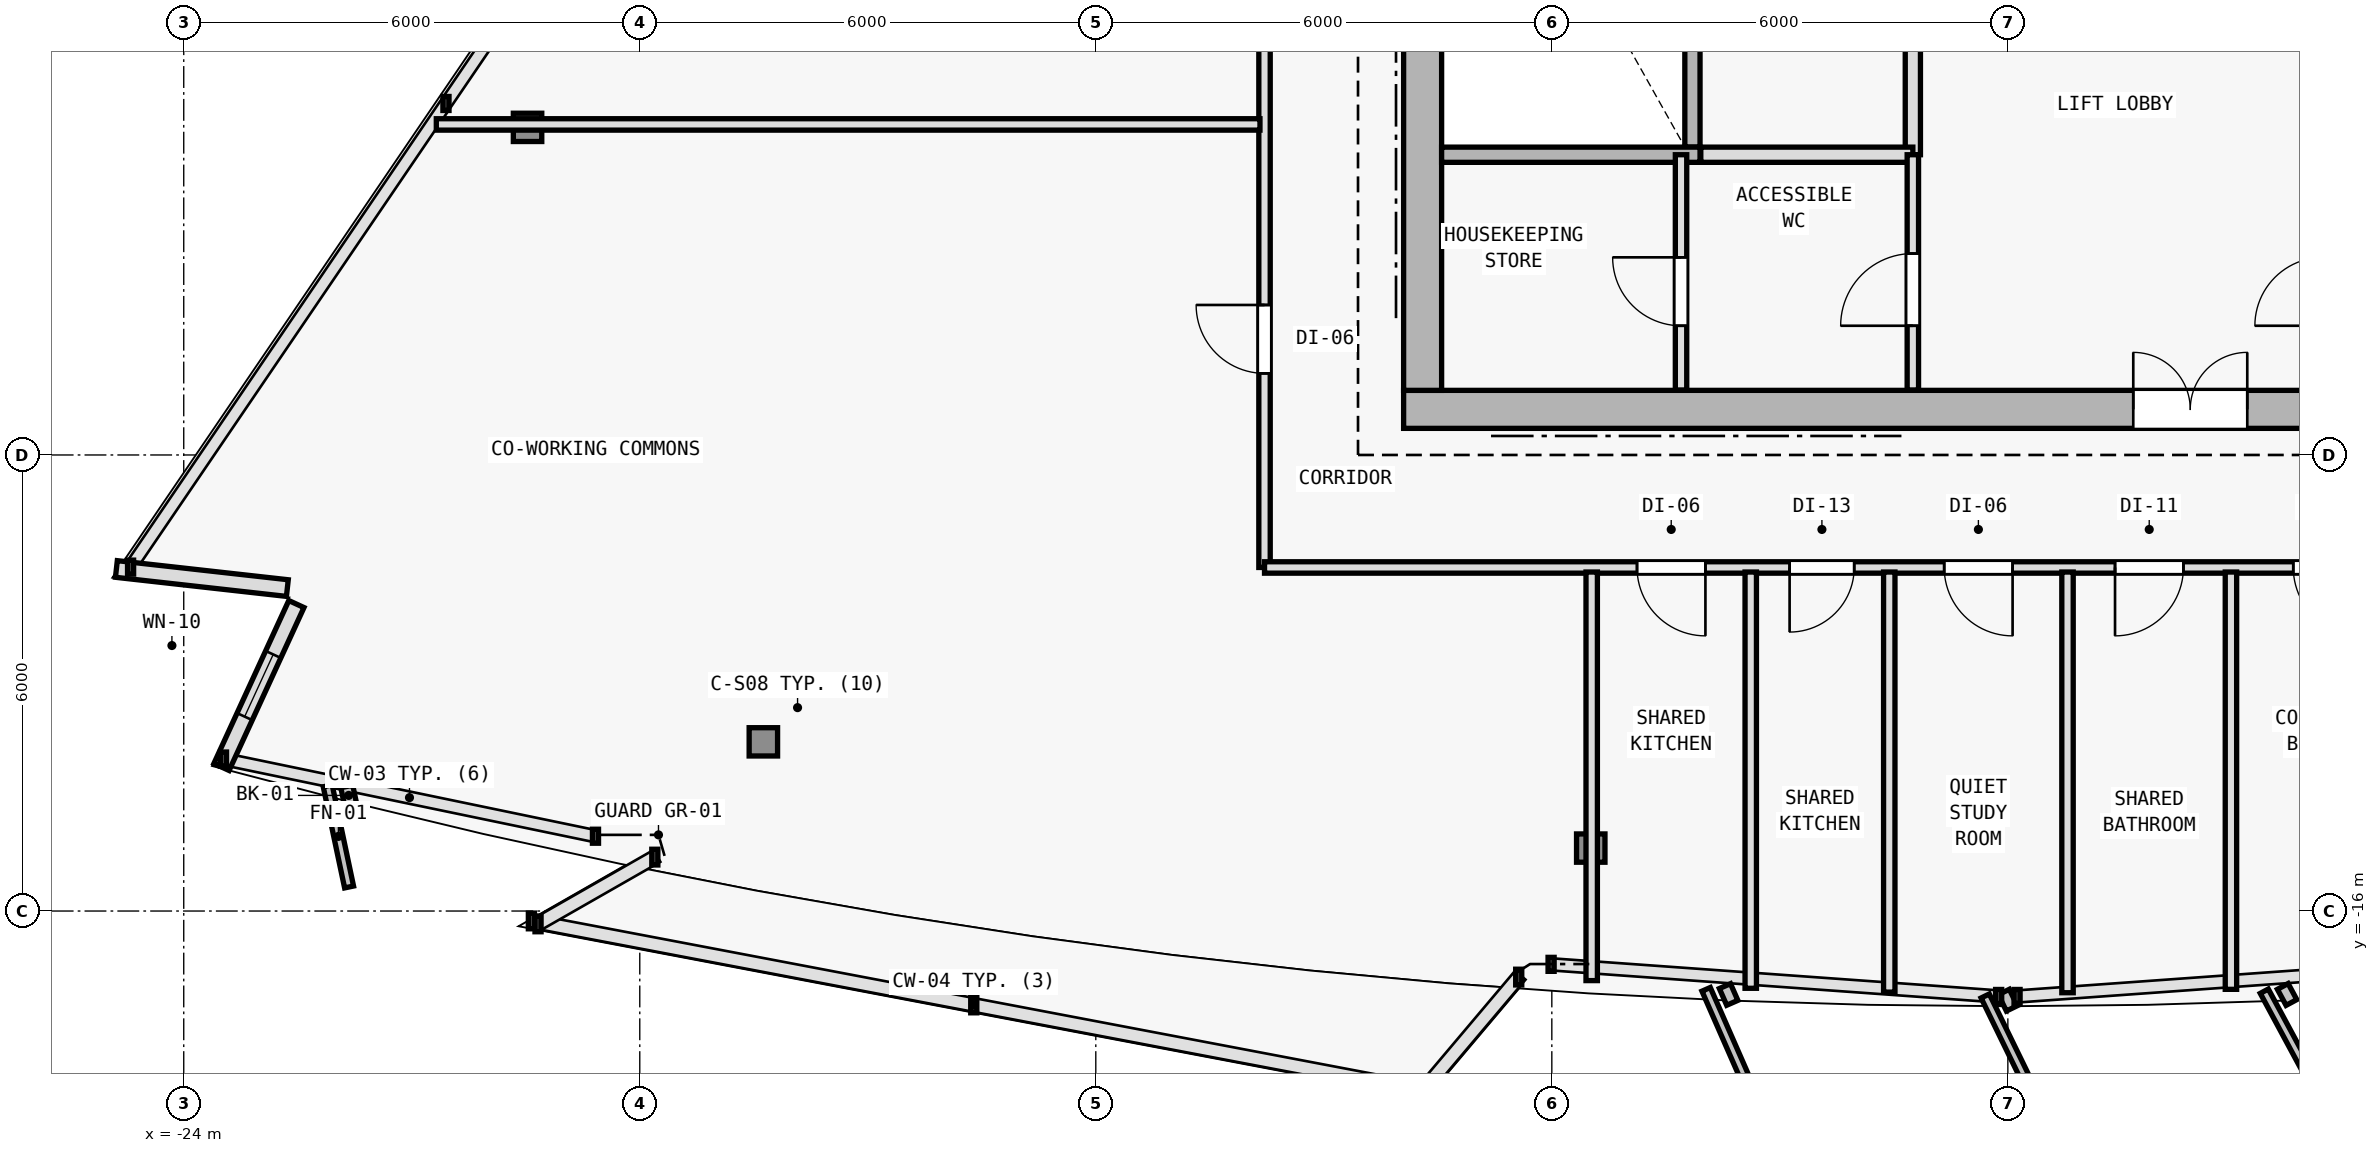
"""IFC4 building model, lengths in metres.
Left out: names, types, materials, properties, quantities, classifications, styles, units other than length and angle.
Written with IfcOpenShell. Run it as: python <this file> out.ifc"""

import sys

from ifc_helpers import new_model, si_unit, direction, frame, frame_2d, origin, origin_2d, place, context, subcontext, project, spatial, rectangle, i_section, extrude, element, fill, save


model = new_model("IFC4")
c1 = context("Model", 3, precision=1e-05, world=origin(), true_north=direction((0.0, 1.0)))
c2 = subcontext(c1, "Body", "Model", "MODEL_VIEW")
j1 = project(units=[si_unit("LENGTHUNIT", "METRE"), si_unit("PLANEANGLEUNIT", "RADIAN")], contexts=[c1])
p1 = place(None, origin())
s1 = spatial("IfcSite", under=j1, at=p1, CompositionType="ELEMENT")
p2 = place(p1, origin())
s2 = spatial("IfcBuilding", under=s1, at=p2, CompositionType="ELEMENT")
p3 = place(p2, frame((0.0, 0.0, 227.1)))
s3 = spatial("IfcBuildingStorey", under=s2, at=p3, CompositionType="ELEMENT", Elevation=227.1)
for number, where, z_axis, x_axis in (
    (1, (-7.7, -9.4, 0.0), (0.0, 0.0, 1.0), (1.0, 0.0, 0.0)),
    (2, (0.0, -9.4, 0.0), (0.0, 0.0, 1.0), (1.0, 0.0, 0.0)),
):
    element("IfcColumn", number, at=place(p3, frame(where, z_axis=z_axis, x_axis=x_axis)), inside=s3, PredefinedType="COLUMN", context=c2, shape_type="SweptSolid", body=[
        extrude(i_section(OverallWidth=0.398, OverallDepth=0.387, WebThickness=0.013, FlangeThickness=0.022, FilletRadius=0.015, at=origin_2d()), origin(), (0.0, 0.0, 1.0), 3.6),
    ])
p4 = place(p3, frame((-16.374, -13.774, 0.005), z_axis=(0.020594893987, 0.033509183946, 0.999226193078), x_axis=(-0.851954850327, 0.523615252838, 0.0)))
e3 = element("IfcColumn", 3, at=p4, inside=s3, PredefinedType="COLUMN", context=c2, shape_type="SweptSolid", body=[
    extrude(i_section(OverallWidth=0.374, OverallDepth=0.372, WebThickness=0.012, FlangeThickness=0.02, FilletRadius=0.015, at=origin_2d()), origin(), (0.0, 0.0, 1.0), 3.592),
])
p5 = place(p3, frame((-5.488, -15.172, 0.005), z_axis=(0.00693381708, 0.03528089279, 0.999353381334), x_axis=(-0.981229659911, 0.192842823335, 0.0)))
e4 = element("IfcColumn", 4, at=p5, inside=s3, PredefinedType="COLUMN", context=c2, shape_type="SweptSolid", body=[
    extrude(i_section(OverallWidth=0.374, OverallDepth=0.372, WebThickness=0.012, FlangeThickness=0.02, FilletRadius=0.015, at=origin_2d()), origin(), (0.0, 0.0, 1.0), 3.592),
])
p6 = place(p3, frame((-19.476, -5.69, 0.005), z_axis=(0.025222449659, 0.021619242565, 0.999448065876), x_axis=(-0.650791373456, 0.759256602365, 0.0)))
e5 = element("IfcColumn", 5, at=p6, inside=s3, PredefinedType="COLUMN", context=c2, shape_type="SweptSolid", body=[
    extrude(i_section(OverallWidth=0.374, OverallDepth=0.372, WebThickness=0.012, FlangeThickness=0.02, FilletRadius=0.015, at=origin_2d()), origin(), (0.0, 0.0, 1.0), 3.591),
])
p7 = place(p3, frame((-22.637, -11.751, 0.0), z_axis=(0.0, 0.0, 1.0), x_axis=(-0.993821756753, 0.110987908368, 0.0)))
e6 = element("IfcWall", 6, at=p7, inside=s3, PredefinedType="SOLIDWALL", context=c2, shape_type="SweptSolid", body=[
    extrude(rectangle(XDim=2.263, YDim=0.22, at=frame_2d((1.132, 0.0))), origin(), (0.0, 0.0, 1.0), 3.35),
])
p8 = place(p3, frame((-23.503, -14.105, 0.0), z_axis=(0.0, 0.0, 1.0), x_axis=(0.417541737863, 0.908657744777, 0.0)))
e7 = element("IfcWall", 7, at=p8, inside=s3, PredefinedType="SOLIDWALL", context=c2, shape_type="SweptSolid", body=[
    extrude(rectangle(XDim=2.359, YDim=0.22, at=frame_2d((1.18, 0.0))), origin(), (0.0, 0.0, 1.0), 3.35),
])
p9 = place(p8, frame((0.729, 0.0, 0.62)))
e8 = element("IfcOpeningElement", 8, at=p9, cuts=e7, PredefinedType="OPENING", context=c2, shape_type="SweptSolid", body=[
    extrude(rectangle(XDim=0.9, YDim=1.6, at=frame_2d((0.45, 0.8))), frame((0.0, 0.12, 0.0), z_axis=(0.0, -1.0, 0.0), x_axis=(1.0, 0.0, 0.0)), (0.0, 0.0, 1.0), 0.24),
])
p10 = place(p3, frame((-7.95, -9.4, 0.0), z_axis=(0.0, 0.0, 1.0), x_axis=(1.0, 0.0, 0.0)))
e9 = element("IfcWall", 9, at=p10, inside=s3, PredefinedType="SHEAR", context=c2, shape_type="SweptSolid", body=[
    extrude(rectangle(XDim=15.9, YDim=0.5, at=frame_2d((7.95, 0.0))), origin(), (0.0, 0.0, 1.0), 3.35),
])
p11 = place(p10, frame((9.6, 0.0, 0.0)))
e10 = element("IfcOpeningElement", 10, at=p11, cuts=e9, PredefinedType="OPENING", context=c2, shape_type="SweptSolid", body=[
    extrude(rectangle(XDim=1.5, YDim=2.2, at=frame_2d((0.75, 1.1))), frame((0.0, 0.26, 0.0), z_axis=(0.0, -1.0, 0.0), x_axis=(1.0, 0.0, 0.0)), (0.0, 0.0, 1.0), 0.52),
])
p12 = place(p3, frame((-7.7, -9.15, 0.0), z_axis=(0.0, 0.0, 1.0), x_axis=(0.0, 1.0, 0.0)))
e11 = element("IfcWall", 11, at=p12, inside=s3, PredefinedType="SHEAR", context=c2, shape_type="SweptSolid", body=[
    extrude(rectangle(XDim=19.1, YDim=0.5, at=frame_2d((9.55, 0.0))), origin(), (0.0, 0.0, 1.0), 3.35),
])
p13 = place(p12, frame((12.7, 0.0, 0.0)))
e12 = element("IfcOpeningElement", 12, at=p13, cuts=e11, PredefinedType="OPENING", context=c2, shape_type="SweptSolid", body=[
    extrude(rectangle(XDim=1.1, YDim=2.15, at=frame_2d((0.55, 1.075))), frame((0.0, 0.26, 0.0), z_axis=(0.0, -1.0, 0.0), x_axis=(1.0, 0.0, 0.0)), (0.0, 0.0, 1.0), 0.52),
])
p14 = place(p3, frame((-4.15, -5.95, 0.0), z_axis=(0.0, 0.0, 1.0), x_axis=(0.0, 1.0, 0.0)))
e13 = element("IfcWall", 13, at=p14, inside=s3, PredefinedType="SOLIDWALL", context=c2, shape_type="SweptSolid", body=[
    extrude(rectangle(XDim=7.2, YDim=0.2, at=frame_2d((3.6, 0.0))), origin(), (0.0, 0.0, 1.0), 3.35),
])
p15 = place(p3, frame((-1.25, -6.05, 0.0), z_axis=(0.0, 0.0, 1.0), x_axis=(0.0, 1.0, 0.0)))
e14 = element("IfcWall", 14, at=p15, inside=s3, PredefinedType="SOLIDWALL", context=c2, shape_type="SweptSolid", body=[
    extrude(rectangle(XDim=8.7, YDim=0.2, at=frame_2d((4.35, 0.0))), origin(), (0.0, 0.0, 1.0), 3.35),
])
p16 = place(p15, frame((3.4, 0.0, 0.0)))
e15 = element("IfcOpeningElement", 15, at=p16, cuts=e14, PredefinedType="OPENING", context=c2, shape_type="SweptSolid", body=[
    extrude(rectangle(XDim=0.95, YDim=2.1, at=frame_2d((0.475, 1.05))), frame((0.0, 0.11, 0.0), z_axis=(0.0, -1.0, 0.0), x_axis=(1.0, 0.0, 0.0)), (0.0, 0.0, 1.0), 0.22),
])
p17 = place(p3, frame((-7.45, -6.05, 0.0), z_axis=(0.0, 0.0, 1.0), x_axis=(1.0, 0.0, 0.0)))
e16 = element("IfcWall", 16, at=p17, inside=s3, PredefinedType="SOLIDWALL", context=c2, shape_type="SweptSolid", body=[
    extrude(rectangle(XDim=3.4, YDim=0.2, at=frame_2d((1.7, 0.0))), origin(), (0.0, 0.0, 1.0), 3.35),
])
p18 = place(p3, frame((-4.04, -6.05, 0.0), z_axis=(0.0, 0.0, 1.0), x_axis=(1.0, 0.0, 0.0)))
e17 = element("IfcWall", 17, at=p18, inside=s3, PredefinedType="SOLIDWALL", context=c2, shape_type="SweptSolid", body=[
    extrude(rectangle(XDim=2.79, YDim=0.2, at=frame_2d((1.395, 0.0))), origin(), (0.0, 0.0, 1.0), 3.35),
])
p19 = place(p3, frame((-1.25, -9.145, 0.0), z_axis=(0.0, 0.0, 1.0), x_axis=(0.0, 1.0, 0.0)))
e18 = element("IfcWall", 18, at=p19, inside=s3, PredefinedType="PARTITIONING", context=c2, shape_type="SweptSolid", body=[
    extrude(rectangle(XDim=3.095, YDim=0.15, at=frame_2d((1.547, 0.0))), origin(), (0.0, 0.0, 1.0), 3.35),
])
p20 = place(p19, frame((0.845, 0.0, 0.0)))
e19 = element("IfcOpeningElement", 19, at=p20, cuts=e18, PredefinedType="OPENING", context=c2, shape_type="SweptSolid", body=[
    extrude(rectangle(XDim=0.95, YDim=2.1, at=frame_2d((0.475, 1.05))), frame((0.0, 0.085, 0.0), z_axis=(0.0, -1.0, 0.0), x_axis=(1.0, 0.0, 0.0)), (0.0, 0.0, 1.0), 0.17),
])
p21 = place(p3, frame((-4.3, -9.145, 0.0), z_axis=(0.0, 0.0, 1.0), x_axis=(0.0, 1.0, 0.0)))
e20 = element("IfcWall", 20, at=p21, inside=s3, PredefinedType="PARTITIONING", context=c2, shape_type="SweptSolid", body=[
    extrude(rectangle(XDim=3.095, YDim=0.15, at=frame_2d((1.547, 0.0))), origin(), (0.0, 0.0, 1.0), 3.35),
])
p22 = place(p21, frame((0.845, 0.0, 0.0)))
e21 = element("IfcOpeningElement", 21, at=p22, cuts=e20, PredefinedType="OPENING", context=c2, shape_type="SweptSolid", body=[
    extrude(rectangle(XDim=0.9, YDim=2.1, at=frame_2d((0.45, 1.05))), frame((0.0, 0.085, 0.0), z_axis=(0.0, -1.0, 0.0), x_axis=(1.0, 0.0, 0.0)), (0.0, 0.0, 1.0), 0.17),
])
p23 = place(p3, frame((-9.78, -11.48, 0.0), z_axis=(0.0, 0.0, 1.0), x_axis=(0.0, 1.0, 0.0)))
e22 = element("IfcWall", 22, at=p23, inside=s3, PredefinedType="PARTITIONING", context=c2, shape_type="SweptSolid", body=[
    extrude(rectangle(XDim=19.706, YDim=0.15, at=frame_2d((9.853, 0.0))), origin(), (0.0, 0.0, 1.0), 2.875),
])
p24 = place(p23, frame((2.553, 0.0, 0.0)))
e23 = element("IfcOpeningElement", 23, at=p24, cuts=e22, PredefinedType="OPENING", context=c2, shape_type="SweptSolid", body=[
    extrude(rectangle(XDim=0.9, YDim=2.1, at=frame_2d((0.45, 1.05))), frame((0.0, 0.085, 0.0), z_axis=(0.0, -1.0, 0.0), x_axis=(1.0, 0.0, 0.0)), (0.0, 0.0, 1.0), 0.17),
])
p25 = place(p23, frame((12.228, 0.0, 0.0)))
e24 = element("IfcOpeningElement", 24, at=p25, cuts=e22, PredefinedType="OPENING", context=c2, shape_type="SweptSolid", body=[
    extrude(rectangle(XDim=0.9, YDim=2.1, at=frame_2d((0.45, 1.05))), frame((0.0, 0.085, 0.0), z_axis=(0.0, -1.0, 0.0), x_axis=(1.0, 0.0, 0.0)), (0.0, 0.0, 1.0), 0.17),
])
p26 = place(p3, frame((9.78, -11.48, 0.0), z_axis=(0.0, 0.0, 1.0), x_axis=(-1.0, 0.0, 0.0)))
e25 = element("IfcWall", 25, at=p26, inside=s3, PredefinedType="PARTITIONING", context=c2, shape_type="SweptSolid", body=[
    extrude(rectangle(XDim=19.56, YDim=0.15, at=frame_2d((9.78, 0.0))), origin(), (0.0, 0.0, 1.0), 3.005),
])
p27 = place(p26, frame((13.759, 0.0, 0.0)))
e26 = element("IfcOpeningElement", 26, at=p27, cuts=e25, PredefinedType="OPENING", context=c2, shape_type="SweptSolid", body=[
    extrude(rectangle(XDim=0.9, YDim=2.1, at=frame_2d((0.45, 1.05))), frame((0.0, 0.085, 0.0), z_axis=(0.0, -1.0, 0.0), x_axis=(1.0, 0.0, 0.0)), (0.0, 0.0, 1.0), 0.17),
])
p28 = place(p26, frame((11.802, 0.0, 0.0)))
e27 = element("IfcOpeningElement", 27, at=p28, cuts=e25, PredefinedType="OPENING", context=c2, shape_type="SweptSolid", body=[
    extrude(rectangle(XDim=0.85, YDim=2.1, at=frame_2d((0.425, 1.05))), frame((0.0, 0.085, 0.0), z_axis=(0.0, -1.0, 0.0), x_axis=(1.0, 0.0, 0.0)), (0.0, 0.0, 1.0), 0.17),
])
p29 = place(p26, frame((9.718, 0.0, 0.0)))
e28 = element("IfcOpeningElement", 28, at=p29, cuts=e25, PredefinedType="OPENING", context=c2, shape_type="SweptSolid", body=[
    extrude(rectangle(XDim=0.9, YDim=2.1, at=frame_2d((0.45, 1.05))), frame((0.0, 0.085, 0.0), z_axis=(0.0, -1.0, 0.0), x_axis=(1.0, 0.0, 0.0)), (0.0, 0.0, 1.0), 0.17),
])
p30 = place(p26, frame((7.47, 0.0, 0.0)))
e29 = element("IfcOpeningElement", 29, at=p30, cuts=e25, PredefinedType="OPENING", context=c2, shape_type="SweptSolid", body=[
    extrude(rectangle(XDim=0.9, YDim=2.1, at=frame_2d((0.45, 1.05))), frame((0.0, 0.085, 0.0), z_axis=(0.0, -1.0, 0.0), x_axis=(1.0, 0.0, 0.0)), (0.0, 0.0, 1.0), 0.17),
])
p31 = place(p26, frame((5.125, 0.0, 0.0)))
e30 = element("IfcOpeningElement", 30, at=p31, cuts=e25, PredefinedType="OPENING", context=c2, shape_type="SweptSolid", body=[
    extrude(rectangle(XDim=0.9, YDim=2.1, at=frame_2d((0.45, 1.05))), frame((0.0, 0.085, 0.0), z_axis=(0.0, -1.0, 0.0), x_axis=(1.0, 0.0, 0.0)), (0.0, 0.0, 1.0), 0.17),
])
p32 = place(p26, frame((1.792, 0.0, 0.0)))
e31 = element("IfcOpeningElement", 31, at=p32, cuts=e25, PredefinedType="OPENING", context=c2, shape_type="SweptSolid", body=[
    extrude(rectangle(XDim=0.9, YDim=2.1, at=frame_2d((0.45, 1.05))), frame((0.0, 0.085, 0.0), z_axis=(0.0, -1.0, 0.0), x_axis=(1.0, 0.0, 0.0)), (0.0, 0.0, 1.0), 0.17),
])
p33 = place(p3, frame((-5.475, -11.54, 0.0), z_axis=(0.0, 0.0, 1.0), x_axis=(0.0, -1.0, 0.0)))
e32 = element("IfcWall", 32, at=p33, inside=s3, PredefinedType="PARTITIONING", context=c2, shape_type="SweptSolid", body=[
    extrude(rectangle(XDim=5.375, YDim=0.15, at=frame_2d((2.688, 0.0))), origin(), (0.0, 0.0, 1.0), 2.775),
])
p34 = place(p3, frame((-9.84, -5.651, 0.0), z_axis=(0.0, 0.0, 1.0), x_axis=(-1.0, 0.0, 0.0)))
e33 = element("IfcWall", 33, at=p34, inside=s3, PredefinedType="PARTITIONING", context=c2, shape_type="SweptSolid", body=[
    extrude(rectangle(XDim=10.837, YDim=0.15, at=frame_2d((5.418, 0.0))), origin(), (0.0, 0.0, 1.0), 2.875),
])
p35 = place(p3, frame((0.785, -11.54, 0.0), z_axis=(0.0, 0.0, 1.0), x_axis=(0.0, -1.0, 0.0)))
e34 = element("IfcWall", 34, at=p35, inside=s3, PredefinedType="PARTITIONING", context=c2, shape_type="SweptSolid", body=[
    extrude(rectangle(XDim=5.535, YDim=0.15, at=frame_2d((2.767, 0.0))), origin(), (0.0, 0.0, 1.0), 2.725),
])
p36 = place(p3, frame((-1.56, -11.54, 0.0), z_axis=(0.0, 0.0, 1.0), x_axis=(0.0, -1.0, 0.0)))
e35 = element("IfcWall", 35, at=p36, inside=s3, PredefinedType="PARTITIONING", context=c2, shape_type="SweptSolid", body=[
    extrude(rectangle(XDim=5.527, YDim=0.15, at=frame_2d((2.763, 0.0))), origin(), (0.0, 0.0, 1.0), 2.725),
])
p37 = place(p3, frame((2.935, -11.54, 0.0), z_axis=(0.0, 0.0, 1.0), x_axis=(0.0, -1.0, 0.0)))
e36 = element("IfcWall", 36, at=p37, inside=s3, PredefinedType="PARTITIONING", context=c2, shape_type="SweptSolid", body=[
    extrude(rectangle(XDim=5.49, YDim=0.15, at=frame_2d((2.745, 0.0))), origin(), (0.0, 0.0, 1.0), 2.725),
])
p38 = place(p3, frame((-3.383, -11.54, 0.0), z_axis=(0.0, 0.0, 1.0), x_axis=(0.0, -1.0, 0.0)))
e37 = element("IfcWall", 37, at=p38, inside=s3, PredefinedType="PARTITIONING", context=c2, shape_type="SweptSolid", body=[
    extrude(rectangle(XDim=5.477, YDim=0.15, at=frame_2d((2.738, 0.0))), origin(), (0.0, 0.0, 1.0), 2.975),
])
p39 = place(p9, origin())
e38 = element("IfcWindow", 38, at=p39, inside=s3, PartitioningType="SINGLE_PANEL", PredefinedType="WINDOW", context=c2, shape_type="SweptSolid", body=[
    extrude(rectangle(XDim=0.9, YDim=1.6, at=frame_2d((0.45, 0.8))), frame((0.0, 0.03, 0.0), z_axis=(0.0, -1.0, 0.0), x_axis=(1.0, 0.0, 0.0)), (0.0, 0.0, 1.0), 0.06),
])
fill(e8, e38)
p40 = place(p11, origin())
e39 = element("IfcDoor", 39, at=p40, inside=s3, OperationType="DOUBLE_DOOR_SINGLE_SWING", PredefinedType="DOOR", context=c2, shape_type="SweptSolid", body=[
    extrude(rectangle(XDim=1.5, YDim=2.2, at=frame_2d((0.75, 1.1))), frame((0.0, 0.025, 0.0), z_axis=(0.0, -1.0, 0.0), x_axis=(1.0, 0.0, 0.0)), (0.0, 0.0, 1.0), 0.05),
])
fill(e10, e39)
p41 = place(p20, origin())
e40 = element("IfcDoor", 40, at=p41, inside=s3, OperationType="SINGLE_SWING_LEFT", PredefinedType="DOOR", context=c2, shape_type="SweptSolid", body=[
    extrude(rectangle(XDim=0.95, YDim=2.1, at=frame_2d((0.475, 1.05))), frame((0.0, 0.025, 0.0), z_axis=(0.0, -1.0, 0.0), x_axis=(1.0, 0.0, 0.0)), (0.0, 0.0, 1.0), 0.05),
])
fill(e19, e40)
p42 = place(p22, origin())
e41 = element("IfcDoor", 41, at=p42, inside=s3, OperationType="SINGLE_SWING_RIGHT", PredefinedType="DOOR", context=c2, shape_type="SweptSolid", body=[
    extrude(rectangle(XDim=0.9, YDim=2.1, at=frame_2d((0.45, 1.05))), frame((0.0, 0.025, 0.0), z_axis=(0.0, -1.0, 0.0), x_axis=(1.0, 0.0, 0.0)), (0.0, 0.0, 1.0), 0.05),
])
fill(e21, e41)
p43 = place(p24, origin())
e42 = element("IfcDoor", 42, at=p43, inside=s3, OperationType="SINGLE_SWING_RIGHT", PredefinedType="DOOR", context=c2, shape_type="SweptSolid", body=[
    extrude(rectangle(XDim=0.9, YDim=2.1, at=frame_2d((0.45, 1.05))), frame((0.0, 0.025, 0.0), z_axis=(0.0, -1.0, 0.0), x_axis=(1.0, 0.0, 0.0)), (0.0, 0.0, 1.0), 0.05),
])
fill(e23, e42)
p44 = place(p27, origin())
e43 = element("IfcDoor", 43, at=p44, inside=s3, OperationType="SINGLE_SWING_LEFT", PredefinedType="DOOR", context=c2, shape_type="SweptSolid", body=[
    extrude(rectangle(XDim=0.9, YDim=2.1, at=frame_2d((0.45, 1.05))), frame((0.0, 0.025, 0.0), z_axis=(0.0, -1.0, 0.0), x_axis=(1.0, 0.0, 0.0)), (0.0, 0.0, 1.0), 0.05),
])
fill(e26, e43)
p45 = place(p28, origin())
e44 = element("IfcDoor", 44, at=p45, inside=s3, OperationType="SINGLE_SWING_RIGHT", PredefinedType="DOOR", context=c2, shape_type="SweptSolid", body=[
    extrude(rectangle(XDim=0.85, YDim=2.1, at=frame_2d((0.425, 1.05))), frame((0.0, 0.025, 0.0), z_axis=(0.0, -1.0, 0.0), x_axis=(1.0, 0.0, 0.0)), (0.0, 0.0, 1.0), 0.05),
])
fill(e27, e44)
p46 = place(p29, origin())
e45 = element("IfcDoor", 45, at=p46, inside=s3, OperationType="SINGLE_SWING_LEFT", PredefinedType="DOOR", context=c2, shape_type="SweptSolid", body=[
    extrude(rectangle(XDim=0.9, YDim=2.1, at=frame_2d((0.45, 1.05))), frame((0.0, 0.025, 0.0), z_axis=(0.0, -1.0, 0.0), x_axis=(1.0, 0.0, 0.0)), (0.0, 0.0, 1.0), 0.05),
])
fill(e28, e45)
p47 = place(p30, origin())
e46 = element("IfcDoor", 46, at=p47, inside=s3, OperationType="SINGLE_SWING_RIGHT", PredefinedType="DOOR", context=c2, shape_type="SweptSolid", body=[
    extrude(rectangle(XDim=0.9, YDim=2.1, at=frame_2d((0.45, 1.05))), frame((0.0, 0.025, 0.0), z_axis=(0.0, -1.0, 0.0), x_axis=(1.0, 0.0, 0.0)), (0.0, 0.0, 1.0), 0.05),
])
fill(e29, e46)
p48 = place(p31, origin())
e47 = element("IfcDoor", 47, at=p48, inside=s3, OperationType="SINGLE_SWING_LEFT", PredefinedType="DOOR", context=c2, shape_type="SweptSolid", body=[
    extrude(rectangle(XDim=0.9, YDim=2.1, at=frame_2d((0.45, 1.05))), frame((0.0, 0.025, 0.0), z_axis=(0.0, -1.0, 0.0), x_axis=(1.0, 0.0, 0.0)), (0.0, 0.0, 1.0), 0.05),
])
fill(e30, e47)
save(model, sys.argv[1])
